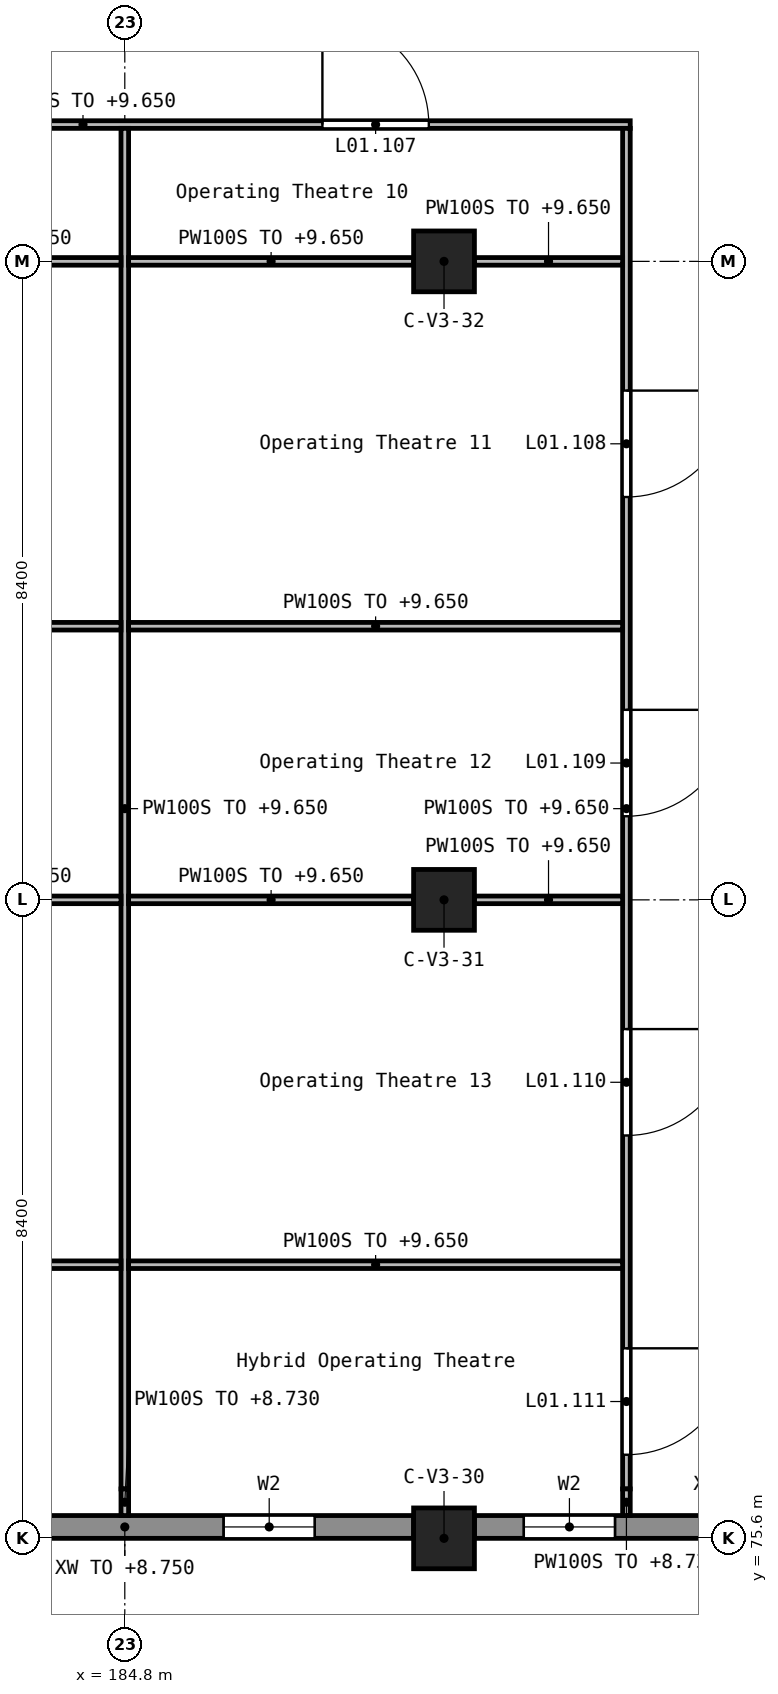
"""IFC4 building model, lengths in metres.
Left out: names, types, materials, properties, quantities, classifications, styles, units other than length and angle.
Written with IfcOpenShell. Run it as: python <this file> out.ifc"""

import sys

from ifc_helpers import new_model, si_unit, direction, frame, frame_2d, origin, origin_2d, place, context, subcontext, project, spatial, rectangle, extrude, element, fill, save


model = new_model("IFC4")
c1 = context("Model", 3, precision=1e-05, world=origin(), true_north=direction((0.0, 1.0)))
c2 = subcontext(c1, "Body", "Model", "MODEL_VIEW")
j1 = project(units=[si_unit("LENGTHUNIT", "METRE"), si_unit("PLANEANGLEUNIT", "RADIAN")], contexts=[c1])
p1 = place(None, origin())
s1 = spatial("IfcSite", under=j1, at=p1, CompositionType="ELEMENT")
p2 = place(p1, origin())
s2 = spatial("IfcBuilding", under=s1, at=p2, CompositionType="ELEMENT")
p3 = place(p2, frame((0.0, 0.0, 5.4)))
s3 = spatial("IfcBuildingStorey", under=s2, at=p3, CompositionType="ELEMENT", Elevation=5.4)
for number, where, z_axis, x_axis in (
    (1, (189.0, 75.6, 0.0), (0.0, 0.0, 1.0), (1.0, 0.0, 0.0)),
    (2, (189.0, 84.0, 0.0), (0.0, 0.0, 1.0), (1.0, 0.0, 0.0)),
    (3, (189.0, 92.4, 0.0), (0.0, 0.0, 1.0), (1.0, 0.0, 0.0)),
):
    element("IfcColumn", number, at=place(p3, frame(where, z_axis=z_axis, x_axis=x_axis)), inside=s3, PredefinedType="COLUMN", context=c2, shape_type="SweptSolid", body=[
        extrude(rectangle(XDim=0.8, YDim=0.8, at=origin_2d()), origin(), (0.0, 0.0, 1.0), 4.5),
    ])
p4 = place(p3, frame((181.0, 75.75, 0.0), z_axis=(0.0, 0.0, 1.0), x_axis=(1.0, 0.0, 0.0)))
e4 = element("IfcWall", 4, at=p4, inside=s3, PredefinedType="STANDARD", context=c2, shape_type="SweptSolid", body=[
    extrude(rectangle(XDim=7.6, YDim=0.3, at=frame_2d((3.8, 0.0))), origin(), (0.0, 0.0, 1.0), 3.35),
])
p5 = place(p4, frame((1.3, 0.0, 1.2)))
e5 = element("IfcOpeningElement", 5, at=p5, cuts=e4, PredefinedType="OPENING", context=c2, shape_type="SweptSolid", body=[
    extrude(rectangle(XDim=1.2, YDim=1.2, at=frame_2d((0.6, 0.6))), frame((0.0, 0.16, 0.0), z_axis=(0.0, -1.0, 0.0), x_axis=(1.0, 0.0, 0.0)), (0.0, 0.0, 1.0), 0.32),
])
p6 = place(p4, frame((5.1, 0.0, 1.2)))
e6 = element("IfcOpeningElement", 6, at=p6, cuts=e4, PredefinedType="OPENING", context=c2, shape_type="SweptSolid", body=[
    extrude(rectangle(XDim=1.2, YDim=1.2, at=frame_2d((0.6, 0.6))), frame((0.0, 0.16, 0.0), z_axis=(0.0, -1.0, 0.0), x_axis=(1.0, 0.0, 0.0)), (0.0, 0.0, 1.0), 0.32),
])
p7 = place(p3, frame((189.4, 75.75, 0.0), z_axis=(0.0, 0.0, 1.0), x_axis=(1.0, 0.0, 0.0)))
e7 = element("IfcWall", 7, at=p7, inside=s3, PredefinedType="STANDARD", context=c2, shape_type="SweptSolid", body=[
    extrude(rectangle(XDim=7.6, YDim=0.3, at=frame_2d((3.8, 0.0))), origin(), (0.0, 0.0, 1.0), 3.35),
])
p8 = place(p7, frame((0.65, 0.0, 1.2)))
e8 = element("IfcOpeningElement", 8, at=p8, cuts=e7, PredefinedType="OPENING", context=c2, shape_type="SweptSolid", body=[
    extrude(rectangle(XDim=1.2, YDim=1.2, at=frame_2d((0.6, 0.6))), frame((0.0, 0.16, 0.0), z_axis=(0.0, -1.0, 0.0), x_axis=(1.0, 0.0, 0.0)), (0.0, 0.0, 1.0), 0.32),
])
p9 = place(p7, frame((5.1, 0.0, 1.2)))
e9 = element("IfcOpeningElement", 9, at=p9, cuts=e7, PredefinedType="OPENING", context=c2, shape_type="SweptSolid", body=[
    extrude(rectangle(XDim=1.2, YDim=1.2, at=frame_2d((0.6, 0.6))), frame((0.0, 0.16, 0.0), z_axis=(0.0, -1.0, 0.0), x_axis=(1.0, 0.0, 0.0)), (0.0, 0.0, 1.0), 0.32),
])
p10 = place(p3, frame((177.05, 94.2, 0.0), z_axis=(0.0, 0.0, 1.0), x_axis=(1.0, 0.0, 0.0)))
e10 = element("IfcWall", 10, at=p10, inside=s3, PredefinedType="PARTITIONING", context=c2, shape_type="SweptSolid", body=[
    extrude(rectangle(XDim=14.4, YDim=0.1, at=frame_2d((7.2, 0.0))), origin(), (0.0, 0.0, 1.0), 4.25),
])
p11 = place(p10, frame((3.15, 0.0, 0.0)))
e11 = element("IfcOpeningElement", 11, at=p11, cuts=e10, PredefinedType="OPENING", context=c2, shape_type="SweptSolid", body=[
    extrude(rectangle(XDim=1.4, YDim=2.1, at=frame_2d((0.7, 1.05))), frame((0.0, 0.06, 0.0), z_axis=(0.0, -1.0, 0.0), x_axis=(1.0, 0.0, 0.0)), (0.0, 0.0, 1.0), 0.12),
])
p12 = place(p10, frame((10.35, 0.0, 0.0)))
e12 = element("IfcOpeningElement", 12, at=p12, cuts=e10, PredefinedType="OPENING", context=c2, shape_type="SweptSolid", body=[
    extrude(rectangle(XDim=1.4, YDim=2.1, at=frame_2d((0.7, 1.05))), frame((0.0, 0.06, 0.0), z_axis=(0.0, -1.0, 0.0), x_axis=(1.0, 0.0, 0.0)), (0.0, 0.0, 1.0), 0.12),
])
p13 = place(p3, frame((184.8, 94.15, 0.0), z_axis=(0.0, 0.0, 1.0), x_axis=(0.0, -1.0, 0.0)))
e13 = element("IfcWall", 13, at=p13, inside=s3, PredefinedType="PARTITIONING", context=c2, shape_type="SweptSolid", body=[
    extrude(rectangle(XDim=17.9, YDim=0.1, at=frame_2d((8.95, 0.0))), origin(), (0.0, 0.0, 1.0), 4.25),
])
p14 = place(p3, frame((184.8, 76.25, 0.0), z_axis=(0.0, 0.0, 1.0), x_axis=(0.0, -1.0, 0.0)))
e14 = element("IfcWall", 14, at=p14, inside=s3, PredefinedType="PARTITIONING", context=c2, shape_type="SweptSolid", body=[
    extrude(rectangle(XDim=0.35, YDim=0.1, at=frame_2d((0.175, 0.0))), origin(), (0.0, 0.0, 1.0), 3.33),
])
p15 = place(p3, frame((191.4, 94.15, 0.0), z_axis=(0.0, 0.0, 1.0), x_axis=(0.0, -1.0, 0.0)))
e15 = element("IfcWall", 15, at=p15, inside=s3, PredefinedType="PARTITIONING", context=c2, shape_type="SweptSolid", body=[
    extrude(rectangle(XDim=17.9, YDim=0.1, at=frame_2d((8.95, 0.0))), origin(), (0.0, 0.0, 1.0), 4.25),
])
p16 = place(p15, frame((3.45, 0.0, 0.0)))
e16 = element("IfcOpeningElement", 16, at=p16, cuts=e15, PredefinedType="OPENING", context=c2, shape_type="SweptSolid", body=[
    extrude(rectangle(XDim=1.4, YDim=2.1, at=frame_2d((0.7, 1.05))), frame((0.0, 0.06, 0.0), z_axis=(0.0, -1.0, 0.0), x_axis=(1.0, 0.0, 0.0)), (0.0, 0.0, 1.0), 0.12),
])
p17 = place(p15, frame((7.65, 0.0, 0.0)))
e17 = element("IfcOpeningElement", 17, at=p17, cuts=e15, PredefinedType="OPENING", context=c2, shape_type="SweptSolid", body=[
    extrude(rectangle(XDim=1.4, YDim=2.1, at=frame_2d((0.7, 1.05))), frame((0.0, 0.06, 0.0), z_axis=(0.0, -1.0, 0.0), x_axis=(1.0, 0.0, 0.0)), (0.0, 0.0, 1.0), 0.12),
])
p18 = place(p15, frame((11.85, 0.0, 0.0)))
e18 = element("IfcOpeningElement", 18, at=p18, cuts=e15, PredefinedType="OPENING", context=c2, shape_type="SweptSolid", body=[
    extrude(rectangle(XDim=1.4, YDim=2.1, at=frame_2d((0.7, 1.05))), frame((0.0, 0.06, 0.0), z_axis=(0.0, -1.0, 0.0), x_axis=(1.0, 0.0, 0.0)), (0.0, 0.0, 1.0), 0.12),
])
p19 = place(p15, frame((16.05, 0.0, 0.0)))
e19 = element("IfcOpeningElement", 19, at=p19, cuts=e15, PredefinedType="OPENING", context=c2, shape_type="SweptSolid", body=[
    extrude(rectangle(XDim=1.4, YDim=2.1, at=frame_2d((0.7, 1.05))), frame((0.0, 0.06, 0.0), z_axis=(0.0, -1.0, 0.0), x_axis=(1.0, 0.0, 0.0)), (0.0, 0.0, 1.0), 0.12),
])
p20 = place(p3, frame((191.4, 76.25, 0.0), z_axis=(0.0, 0.0, 1.0), x_axis=(0.0, -1.0, 0.0)))
e20 = element("IfcWall", 20, at=p20, inside=s3, PredefinedType="PARTITIONING", context=c2, shape_type="SweptSolid", body=[
    extrude(rectangle(XDim=0.35, YDim=0.1, at=frame_2d((0.175, 0.0))), origin(), (0.0, 0.0, 1.0), 3.33),
])
p21 = place(p3, frame((177.05, 79.2, 0.0), z_axis=(0.0, 0.0, 1.0), x_axis=(1.0, 0.0, 0.0)))
e21 = element("IfcWall", 21, at=p21, inside=s3, PredefinedType="PARTITIONING", context=c2, shape_type="SweptSolid", body=[
    extrude(rectangle(XDim=7.7, YDim=0.1, at=frame_2d((3.85, 0.0))), origin(), (0.0, 0.0, 1.0), 4.25),
])
p22 = place(p3, frame((184.85, 79.2, 0.0), z_axis=(0.0, 0.0, 1.0), x_axis=(1.0, 0.0, 0.0)))
e22 = element("IfcWall", 22, at=p22, inside=s3, PredefinedType="PARTITIONING", context=c2, shape_type="SweptSolid", body=[
    extrude(rectangle(XDim=6.5, YDim=0.1, at=frame_2d((3.25, 0.0))), origin(), (0.0, 0.0, 1.0), 4.25),
])
for number, where, z_axis, x_axis in (
    (23, (181.0, 84.0, 0.0), (0.0, 0.0, 1.0), (1.0, 0.0, 0.0)),
    (24, (184.85, 84.0, 0.0), (0.0, 0.0, 1.0), (1.0, 0.0, 0.0)),
):
    element("IfcWall", number, at=place(p3, frame(where, z_axis=z_axis, x_axis=x_axis)), inside=s3, PredefinedType="PARTITIONING", context=c2, shape_type="SweptSolid", body=[
        extrude(rectangle(XDim=3.75, YDim=0.1, at=frame_2d((1.875, 0.0))), origin(), (0.0, 0.0, 1.0), 4.25),
    ])
p23 = place(p3, frame((189.4, 84.0, 0.0), z_axis=(0.0, 0.0, 1.0), x_axis=(1.0, 0.0, 0.0)))
e25 = element("IfcWall", 25, at=p23, inside=s3, PredefinedType="PARTITIONING", context=c2, shape_type="SweptSolid", body=[
    extrude(rectangle(XDim=1.95, YDim=0.1, at=frame_2d((0.975, 0.0))), origin(), (0.0, 0.0, 1.0), 4.25),
])
p24 = place(p3, frame((177.05, 87.6, 0.0), z_axis=(0.0, 0.0, 1.0), x_axis=(1.0, 0.0, 0.0)))
e26 = element("IfcWall", 26, at=p24, inside=s3, PredefinedType="PARTITIONING", context=c2, shape_type="SweptSolid", body=[
    extrude(rectangle(XDim=7.7, YDim=0.1, at=frame_2d((3.85, 0.0))), origin(), (0.0, 0.0, 1.0), 4.25),
])
p25 = place(p3, frame((184.85, 87.6, 0.0), z_axis=(0.0, 0.0, 1.0), x_axis=(1.0, 0.0, 0.0)))
e27 = element("IfcWall", 27, at=p25, inside=s3, PredefinedType="PARTITIONING", context=c2, shape_type="SweptSolid", body=[
    extrude(rectangle(XDim=6.5, YDim=0.1, at=frame_2d((3.25, 0.0))), origin(), (0.0, 0.0, 1.0), 4.25),
])
for number, where, z_axis, x_axis in (
    (28, (181.0, 92.4, 0.0), (0.0, 0.0, 1.0), (1.0, 0.0, 0.0)),
    (29, (184.85, 92.4, 0.0), (0.0, 0.0, 1.0), (1.0, 0.0, 0.0)),
):
    element("IfcWall", number, at=place(p3, frame(where, z_axis=z_axis, x_axis=x_axis)), inside=s3, PredefinedType="PARTITIONING", context=c2, shape_type="SweptSolid", body=[
        extrude(rectangle(XDim=3.75, YDim=0.1, at=frame_2d((1.875, 0.0))), origin(), (0.0, 0.0, 1.0), 4.25),
    ])
p26 = place(p3, frame((189.4, 92.4, 0.0), z_axis=(0.0, 0.0, 1.0), x_axis=(1.0, 0.0, 0.0)))
e30 = element("IfcWall", 30, at=p26, inside=s3, PredefinedType="PARTITIONING", context=c2, shape_type="SweptSolid", body=[
    extrude(rectangle(XDim=1.95, YDim=0.1, at=frame_2d((0.975, 0.0))), origin(), (0.0, 0.0, 1.0), 4.25),
])
p27 = place(p6, origin())
e31 = element("IfcWindow", 31, at=p27, inside=s3, PartitioningType="SINGLE_PANEL", PredefinedType="WINDOW", context=c2, shape_type="SweptSolid", body=[
    extrude(rectangle(XDim=1.2, YDim=1.2, at=frame_2d((0.6, 0.6))), frame((0.0, 0.03, 0.0), z_axis=(0.0, -1.0, 0.0), x_axis=(1.0, 0.0, 0.0)), (0.0, 0.0, 1.0), 0.06),
])
fill(e6, e31)
p28 = place(p8, origin())
e32 = element("IfcWindow", 32, at=p28, inside=s3, PartitioningType="SINGLE_PANEL", PredefinedType="WINDOW", context=c2, shape_type="SweptSolid", body=[
    extrude(rectangle(XDim=1.2, YDim=1.2, at=frame_2d((0.6, 0.6))), frame((0.0, 0.03, 0.0), z_axis=(0.0, -1.0, 0.0), x_axis=(1.0, 0.0, 0.0)), (0.0, 0.0, 1.0), 0.06),
])
fill(e8, e32)
p29 = place(p12, frame((1.4, 0.0, 0.0), z_axis=(0.0, 0.0, 1.0), x_axis=(-1.0, 0.0, 0.0)))
e33 = element("IfcDoor", 33, at=p29, inside=s3, OperationType="DOUBLE_DOOR_SINGLE_SWING", PredefinedType="DOOR", context=c2, shape_type="SweptSolid", body=[
    extrude(rectangle(XDim=1.4, YDim=2.1, at=frame_2d((0.7, 1.05))), frame((0.0, 0.025, 0.0), z_axis=(0.0, -1.0, 0.0), x_axis=(1.0, 0.0, 0.0)), (0.0, 0.0, 1.0), 0.05),
])
fill(e12, e33)
p30 = place(p16, frame((1.4, 0.0, 0.0), z_axis=(0.0, 0.0, 1.0), x_axis=(-1.0, 0.0, 0.0)))
e34 = element("IfcDoor", 34, at=p30, inside=s3, OperationType="DOUBLE_DOOR_SINGLE_SWING", PredefinedType="DOOR", context=c2, shape_type="SweptSolid", body=[
    extrude(rectangle(XDim=1.4, YDim=2.1, at=frame_2d((0.7, 1.05))), frame((0.0, 0.025, 0.0), z_axis=(0.0, -1.0, 0.0), x_axis=(1.0, 0.0, 0.0)), (0.0, 0.0, 1.0), 0.05),
])
fill(e16, e34)
p31 = place(p17, frame((1.4, 0.0, 0.0), z_axis=(0.0, 0.0, 1.0), x_axis=(-1.0, 0.0, 0.0)))
e35 = element("IfcDoor", 35, at=p31, inside=s3, OperationType="DOUBLE_DOOR_SINGLE_SWING", PredefinedType="DOOR", context=c2, shape_type="SweptSolid", body=[
    extrude(rectangle(XDim=1.4, YDim=2.1, at=frame_2d((0.7, 1.05))), frame((0.0, 0.025, 0.0), z_axis=(0.0, -1.0, 0.0), x_axis=(1.0, 0.0, 0.0)), (0.0, 0.0, 1.0), 0.05),
])
fill(e17, e35)
p32 = place(p18, frame((1.4, 0.0, 0.0), z_axis=(0.0, 0.0, 1.0), x_axis=(-1.0, 0.0, 0.0)))
e36 = element("IfcDoor", 36, at=p32, inside=s3, OperationType="DOUBLE_DOOR_SINGLE_SWING", PredefinedType="DOOR", context=c2, shape_type="SweptSolid", body=[
    extrude(rectangle(XDim=1.4, YDim=2.1, at=frame_2d((0.7, 1.05))), frame((0.0, 0.025, 0.0), z_axis=(0.0, -1.0, 0.0), x_axis=(1.0, 0.0, 0.0)), (0.0, 0.0, 1.0), 0.05),
])
fill(e18, e36)
p33 = place(p19, frame((1.4, 0.0, 0.0), z_axis=(0.0, 0.0, 1.0), x_axis=(-1.0, 0.0, 0.0)))
e37 = element("IfcDoor", 37, at=p33, inside=s3, OperationType="DOUBLE_DOOR_SINGLE_SWING", PredefinedType="DOOR", context=c2, shape_type="SweptSolid", body=[
    extrude(rectangle(XDim=1.4, YDim=2.1, at=frame_2d((0.7, 1.05))), frame((0.0, 0.025, 0.0), z_axis=(0.0, -1.0, 0.0), x_axis=(1.0, 0.0, 0.0)), (0.0, 0.0, 1.0), 0.05),
])
fill(e19, e37)
save(model, sys.argv[1])
